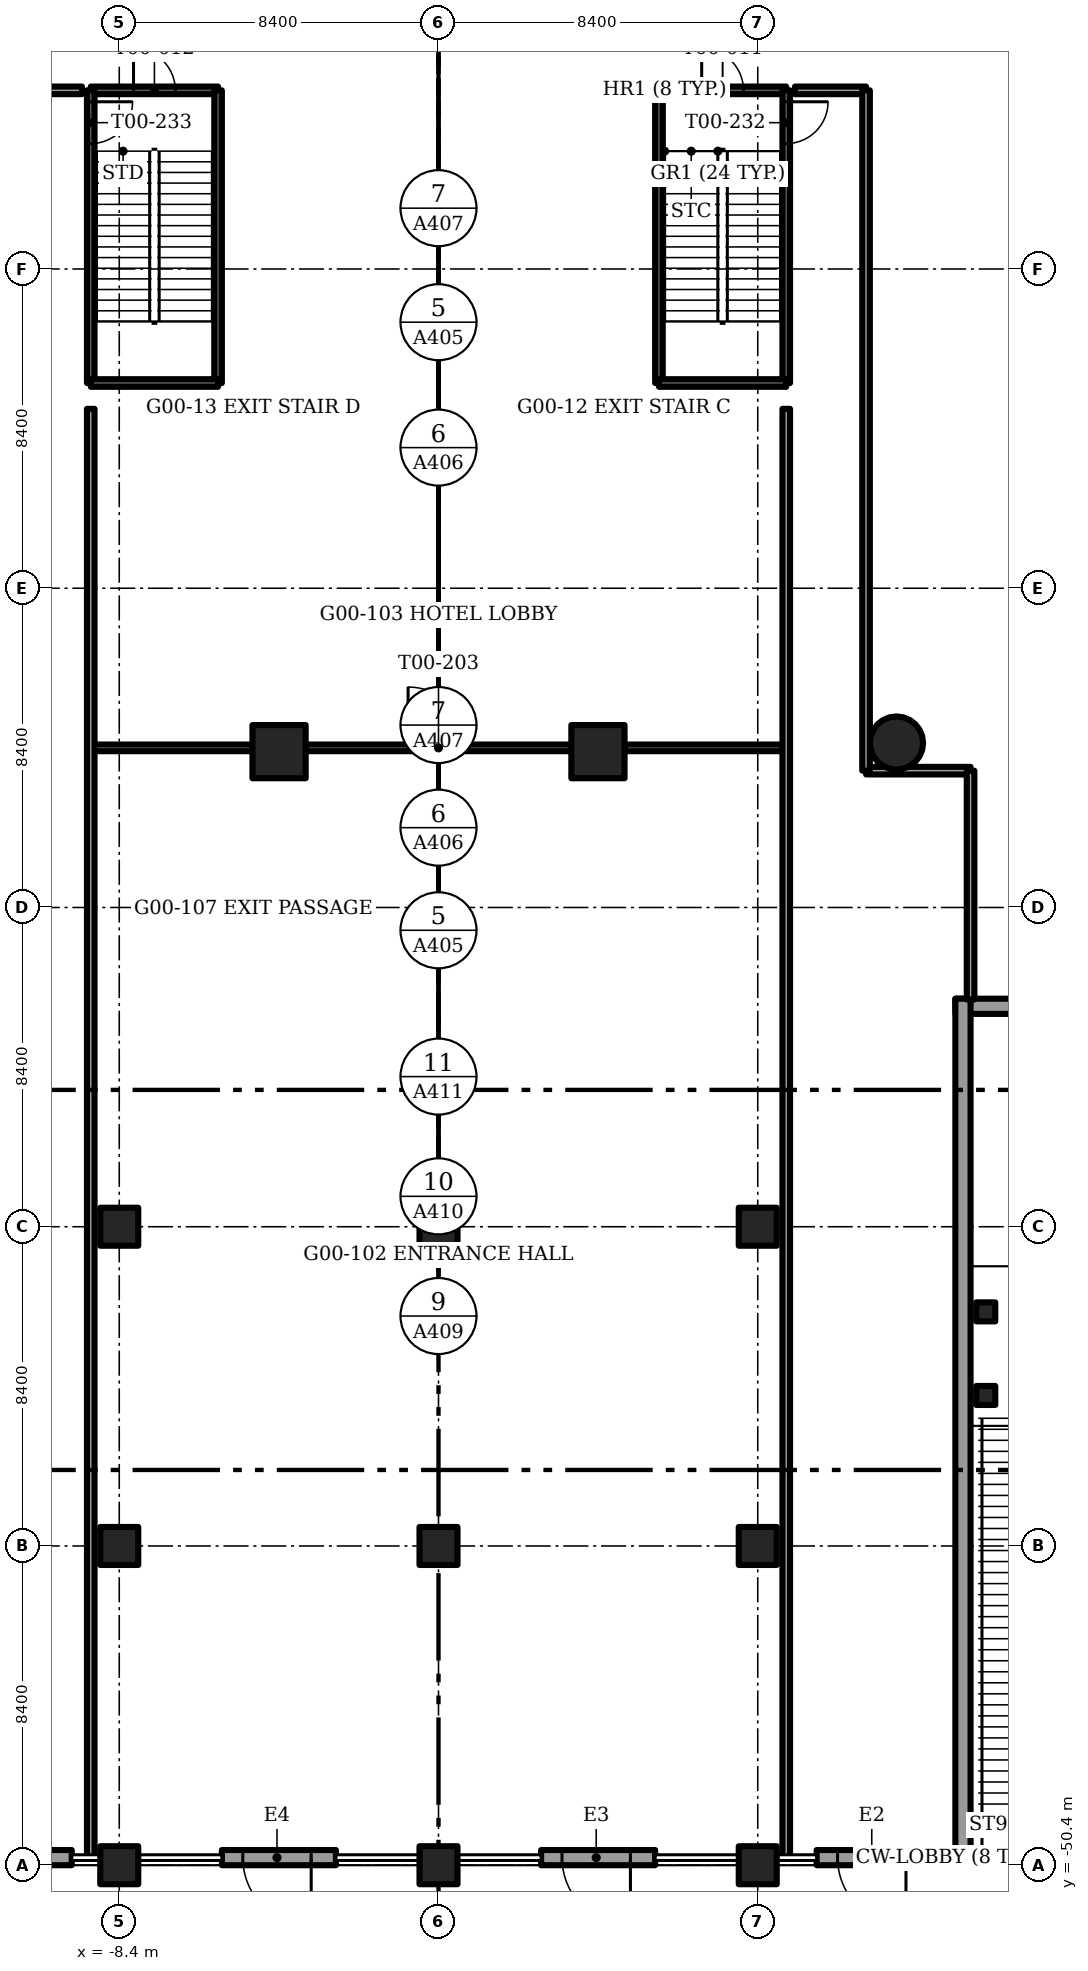
"""IFC4 building model, lengths in metres.
Left out: names, types, materials, properties, quantities, classifications, styles, units other than length and angle.
Written with IfcOpenShell. Run it as: python <this file> out.ifc"""

import sys

from ifc_helpers import new_model, si_unit, direction, frame, frame_2d, origin, origin_2d, place, context, subcontext, project, spatial, rectangle, circle, extrude, element, fill, save


model = new_model("IFC4")
c1 = context("Model", 3, precision=1e-05, world=origin(), true_north=direction((0.0, 1.0)))
c2 = subcontext(c1, "Body", "Model", "MODEL_VIEW")
j1 = project(units=[si_unit("LENGTHUNIT", "METRE"), si_unit("PLANEANGLEUNIT", "RADIAN")], contexts=[c1])
p1 = place(None, origin())
s1 = spatial("IfcSite", under=j1, at=p1, CompositionType="ELEMENT")
p2 = place(p1, origin())
s2 = spatial("IfcBuilding", under=s1, at=p2, CompositionType="ELEMENT")
p3 = place(p2, origin())
s3 = spatial("IfcBuildingStorey", under=s2, at=p3, CompositionType="ELEMENT", Elevation=0.0)
for number, where, z_axis, x_axis in (
    (1, (-8.4, -50.4, -0.35), (0.0, 0.0, 1.0), (1.0, 0.0, 0.0)),
    (2, (-8.4, -42.0, -0.35), (0.0, 0.0, 1.0), (1.0, 0.0, 0.0)),
    (3, (-8.4, -33.6, -0.35), (0.0, 0.0, 1.0), (1.0, 0.0, 0.0)),
    (4, (0.0, -50.4, -0.35), (0.0, 0.0, 1.0), (1.0, 0.0, 0.0)),
    (5, (0.0, -42.0, -0.35), (0.0, 0.0, 1.0), (1.0, 0.0, 0.0)),
    (6, (0.0, -33.6, -0.35), (0.0, 0.0, 1.0), (1.0, 0.0, 0.0)),
    (7, (8.4, -50.4, -0.35), (0.0, 0.0, 1.0), (1.0, 0.0, 0.0)),
    (8, (8.4, -42.0, -0.35), (0.0, 0.0, 1.0), (1.0, 0.0, 0.0)),
    (9, (8.4, -33.6, -0.35), (0.0, 0.0, 1.0), (1.0, 0.0, 0.0)),
):
    element("IfcColumn", number, at=place(p3, frame(where, z_axis=z_axis, x_axis=x_axis)), inside=s3, PredefinedType="COLUMN", context=c2, shape_type="SweptSolid", body=[
        extrude(rectangle(XDim=1.0, YDim=1.0, at=origin_2d()), origin(), (0.0, 0.0, 1.0), 6.0),
    ])
p4 = place(p3, frame((12.051, -20.872, -0.35), z_axis=(0.0, 0.0, 1.0), x_axis=(1.0, 0.0, 0.0)))
e10 = element("IfcColumn", 10, at=p4, inside=s3, PredefinedType="COLUMN", context=c2, shape_type="SweptSolid", body=[
    extrude(circle(Radius=0.7, at=origin_2d()), origin(), (0.0, 0.0, 1.0), 5.15),
])
for number, where, z_axis, x_axis in (
    (11, (-4.195, -21.1, -0.35), (0.0, 0.0, 1.0), (-1.0, 0.0, 0.0)),
    (12, (4.195, -21.1, -0.35), (0.0, 0.0, 1.0), (-1.0, 0.0, 0.0)),
):
    element("IfcColumn", number, at=place(p3, frame(where, z_axis=z_axis, x_axis=x_axis)), inside=s3, PredefinedType="COLUMN", context=c2, shape_type="SweptSolid", body=[
        extrude(rectangle(XDim=1.4, YDim=1.4, at=origin_2d()), origin(), (0.0, 0.0, 1.0), 5.15),
    ])
p5 = place(p3, frame((12.95, -50.2, 0.0), z_axis=(0.0, 0.0, 1.0), x_axis=(-1.0, 0.0, 0.0)))
e13 = element("IfcWall", 13, at=p5, inside=s3, PredefinedType="SOLIDWALL", context=c2, shape_type="SweptSolid", body=[
    extrude(rectangle(XDim=3.0, YDim=0.4, at=frame_2d((1.5, 0.0))), origin(), (0.0, 0.0, 1.0), 5.65),
])
p6 = place(p5, frame((0.65, 0.0, 0.0)))
e14 = element("IfcOpeningElement", 14, at=p6, cuts=e13, PredefinedType="OPENING", context=c2, shape_type="SweptSolid", body=[
    extrude(rectangle(XDim=1.8, YDim=2.4, at=frame_2d((0.9, 1.2))), frame((0.0, 0.2, 0.0), z_axis=(0.0, -1.0, 0.0), x_axis=(1.0, 0.0, 0.0)), (0.0, 0.0, 1.0), 0.4),
])
p7 = place(p3, frame((5.7, -50.2, 0.0), z_axis=(0.0, 0.0, 1.0), x_axis=(-1.0, 0.0, 0.0)))
e15 = element("IfcWall", 15, at=p7, inside=s3, PredefinedType="SOLIDWALL", context=c2, shape_type="SweptSolid", body=[
    extrude(rectangle(XDim=3.0, YDim=0.4, at=frame_2d((1.5, 0.0))), origin(), (0.0, 0.0, 1.0), 5.65),
])
p8 = place(p7, frame((0.65, 0.0, 0.0)))
e16 = element("IfcOpeningElement", 16, at=p8, cuts=e15, PredefinedType="OPENING", context=c2, shape_type="SweptSolid", body=[
    extrude(rectangle(XDim=1.8, YDim=2.4, at=frame_2d((0.9, 1.2))), frame((0.0, 0.2, 0.0), z_axis=(0.0, -1.0, 0.0), x_axis=(1.0, 0.0, 0.0)), (0.0, 0.0, 1.0), 0.4),
])
p9 = place(p3, frame((-2.7, -50.2, 0.0), z_axis=(0.0, 0.0, 1.0), x_axis=(-1.0, 0.0, 0.0)))
e17 = element("IfcWall", 17, at=p9, inside=s3, PredefinedType="SOLIDWALL", context=c2, shape_type="SweptSolid", body=[
    extrude(rectangle(XDim=3.0, YDim=0.4, at=frame_2d((1.5, 0.0))), origin(), (0.0, 0.0, 1.0), 5.65),
])
p10 = place(p9, frame((0.65, 0.0, 0.0)))
e18 = element("IfcOpeningElement", 18, at=p10, cuts=e17, PredefinedType="OPENING", context=c2, shape_type="SweptSolid", body=[
    extrude(rectangle(XDim=1.8, YDim=2.4, at=frame_2d((0.9, 1.2))), frame((0.0, 0.2, 0.0), z_axis=(0.0, -1.0, 0.0), x_axis=(1.0, 0.0, 0.0)), (0.0, 0.0, 1.0), 0.4),
])
p11 = place(p3, frame((-9.65, -50.2, 0.0), z_axis=(0.0, 0.0, 1.0), x_axis=(-1.0, 0.0, 0.0)))
e19 = element("IfcWall", 19, at=p11, inside=s3, PredefinedType="SOLIDWALL", context=c2, shape_type="SweptSolid", body=[
    extrude(rectangle(XDim=3.0, YDim=0.4, at=frame_2d((1.5, 0.0))), origin(), (0.0, 0.0, 1.0), 5.65),
])
p12 = place(p11, frame((0.65, 0.0, 0.0)))
e20 = element("IfcOpeningElement", 20, at=p12, cuts=e19, PredefinedType="OPENING", context=c2, shape_type="SweptSolid", body=[
    extrude(rectangle(XDim=1.8, YDim=2.4, at=frame_2d((0.9, 1.2))), frame((0.0, 0.2, 0.0), z_axis=(0.0, -1.0, 0.0), x_axis=(1.0, 0.0, 0.0)), (0.0, 0.0, 1.0), 0.4),
])
p13 = place(p3, frame((13.8, -27.6, 0.0), z_axis=(0.0, 0.0, 1.0), x_axis=(0.0, -1.0, 0.0)))
e21 = element("IfcWall", 21, at=p13, inside=s3, PredefinedType="SOLIDWALL", context=c2, shape_type="SweptSolid", body=[
    extrude(rectangle(XDim=22.8, YDim=0.4, at=frame_2d((11.4, 0.0))), origin(), (0.0, 0.0, 1.0), 5.65),
])
p14 = place(p3, frame((13.6, -27.8, 0.0), z_axis=(0.0, 0.0, 1.0), x_axis=(1.0, 0.0, 0.0)))
e22 = element("IfcWall", 22, at=p14, inside=s3, PredefinedType="SOLIDWALL", context=c2, shape_type="SweptSolid", body=[
    extrude(rectangle(XDim=14.8, YDim=0.4, at=frame_2d((7.4, 0.0))), origin(), (0.0, 0.0, 1.0), 5.65),
])
for number, where, z_axis, x_axis in (
    (23, (14.4, -38.04, 0.0), (0.0, 0.0, 1.0), (1.0, 0.0, 0.0)),
    (24, (14.4, -35.84, 0.0), (0.0, 0.0, 1.0), (1.0, 0.0, 0.0)),
):
    element("IfcColumn", number, at=place(p3, frame(where, z_axis=z_axis, x_axis=x_axis)), inside=s3, PredefinedType="COLUMN", context=c2, shape_type="SweptSolid", body=[
        extrude(rectangle(XDim=0.5, YDim=0.5, at=origin_2d()), origin(), (0.0, 0.0, 1.0), 5.65),
    ])
p15 = place(p3, frame((5.8, -3.7, -0.35), z_axis=(0.0, 0.0, 1.0), x_axis=(1.0, 0.0, 0.0)))
e25 = element("IfcWall", 25, at=p15, inside=s3, PredefinedType="SOLIDWALL", context=c2, shape_type="SweptSolid", body=[
    extrude(rectangle(XDim=3.35, YDim=0.2, at=frame_2d((1.675, 0.0))), origin(), (0.0, 0.0, 1.0), 6.0),
])
p16 = place(p15, frame((1.125, 0.0, 0.0)))
e26 = element("IfcOpeningElement", 26, at=p16, cuts=e25, PredefinedType="OPENING", context=c2, shape_type="SweptSolid", body=[
    extrude(rectangle(XDim=1.1, YDim=2.1, at=frame_2d((0.55, 1.05))), frame((0.0, 0.1, 0.0), z_axis=(0.0, -1.0, 0.0), x_axis=(1.0, 0.0, 0.0)), (0.0, 0.0, 1.0), 0.2),
])
p17 = place(p3, frame((5.8, -3.7, -0.35), z_axis=(0.0, 0.0, 1.0), x_axis=(0.0, -1.0, 0.0)))
e27 = element("IfcWall", 27, at=p17, inside=s3, PredefinedType="SOLIDWALL", context=c2, shape_type="SweptSolid", body=[
    extrude(rectangle(XDim=7.7, YDim=0.2, at=frame_2d((3.85, 0.0))), origin(), (0.0, 0.0, 1.0), 6.0),
])
p18 = place(p3, frame((9.15, -3.7, -0.35), z_axis=(0.0, 0.0, 1.0), x_axis=(0.0, -1.0, 0.0)))
e28 = element("IfcWall", 28, at=p18, inside=s3, PredefinedType="SOLIDWALL", context=c2, shape_type="SweptSolid", body=[
    extrude(rectangle(XDim=7.7, YDim=0.2, at=frame_2d((3.85, 0.0))), origin(), (0.0, 0.0, 1.0), 6.0),
])
p19 = place(p18, frame((0.3, 0.0, 0.0)))
e29 = element("IfcOpeningElement", 29, at=p19, cuts=e28, PredefinedType="OPENING", context=c2, shape_type="SweptSolid", body=[
    extrude(rectangle(XDim=1.1, YDim=2.1, at=frame_2d((0.55, 1.05))), frame((0.0, 0.1, 0.0), z_axis=(0.0, -1.0, 0.0), x_axis=(1.0, 0.0, 0.0)), (0.0, 0.0, 1.0), 0.2),
])
p20 = place(p3, frame((5.8, -11.4, -0.35), z_axis=(0.0, 0.0, 1.0), x_axis=(1.0, 0.0, 0.0)))
e30 = element("IfcWall", 30, at=p20, inside=s3, PredefinedType="SOLIDWALL", context=c2, shape_type="SweptSolid", body=[
    extrude(rectangle(XDim=3.35, YDim=0.2, at=frame_2d((1.675, 0.0))), origin(), (0.0, 0.0, 1.0), 6.0),
])
p21 = place(p3, frame((-9.15, -3.7, 0.0), z_axis=(0.0, 0.0, 1.0), x_axis=(1.0, 0.0, 0.0)))
e31 = element("IfcWall", 31, at=p21, inside=s3, PredefinedType="SOLIDWALL", context=c2, shape_type="SweptSolid", body=[
    extrude(rectangle(XDim=3.35, YDim=0.2, at=frame_2d((1.675, 0.0))), origin(), (0.0, 0.0, 1.0), 5.65),
])
p22 = place(p21, frame((1.125, 0.0, 0.0)))
e32 = element("IfcOpeningElement", 32, at=p22, cuts=e31, PredefinedType="OPENING", context=c2, shape_type="SweptSolid", body=[
    extrude(rectangle(XDim=1.1, YDim=2.1, at=frame_2d((0.55, 1.05))), frame((0.0, 0.1, 0.0), z_axis=(0.0, -1.0, 0.0), x_axis=(1.0, 0.0, 0.0)), (0.0, 0.0, 1.0), 0.2),
])
p23 = place(p3, frame((-9.15, -3.7, 0.0), z_axis=(0.0, 0.0, 1.0), x_axis=(0.0, -1.0, 0.0)))
e33 = element("IfcWall", 33, at=p23, inside=s3, PredefinedType="SOLIDWALL", context=c2, shape_type="SweptSolid", body=[
    extrude(rectangle(XDim=7.7, YDim=0.2, at=frame_2d((3.85, 0.0))), origin(), (0.0, 0.0, 1.0), 5.65),
])
p24 = place(p23, frame((0.3, 0.0, 0.0)))
e34 = element("IfcOpeningElement", 34, at=p24, cuts=e33, PredefinedType="OPENING", context=c2, shape_type="SweptSolid", body=[
    extrude(rectangle(XDim=1.1, YDim=2.1, at=frame_2d((0.55, 1.05))), frame((0.0, 0.1, 0.0), z_axis=(0.0, -1.0, 0.0), x_axis=(1.0, 0.0, 0.0)), (0.0, 0.0, 1.0), 0.2),
])
p25 = place(p3, frame((-5.8, -3.7, 0.0), z_axis=(0.0, 0.0, 1.0), x_axis=(0.0, -1.0, 0.0)))
e35 = element("IfcWall", 35, at=p25, inside=s3, PredefinedType="SOLIDWALL", context=c2, shape_type="SweptSolid", body=[
    extrude(rectangle(XDim=7.7, YDim=0.2, at=frame_2d((3.85, 0.0))), origin(), (0.0, 0.0, 1.0), 5.65),
])
p26 = place(p3, frame((-9.15, -11.4, 0.0), z_axis=(0.0, 0.0, 1.0), x_axis=(1.0, 0.0, 0.0)))
e36 = element("IfcWall", 36, at=p26, inside=s3, PredefinedType="SOLIDWALL", context=c2, shape_type="SweptSolid", body=[
    extrude(rectangle(XDim=3.35, YDim=0.2, at=frame_2d((1.675, 0.0))), origin(), (0.0, 0.0, 1.0), 5.65),
])
p27 = place(p3, frame((-9.15, -21.0, 0.0), z_axis=(0.0, 0.0, 1.0), x_axis=(1.0, 0.0, 0.0)))
e37 = element("IfcWall", 37, at=p27, inside=s3, PredefinedType="PARTITIONING", context=c2, shape_type="SweptSolid", body=[
    extrude(rectangle(XDim=18.3, YDim=0.175, at=frame_2d((9.15, 0.0))), origin(), (0.0, 0.0, 1.0), 4.8),
])
p28 = place(p27, frame((8.35, 0.0, 0.0)))
e38 = element("IfcOpeningElement", 38, at=p28, cuts=e37, PredefinedType="OPENING", context=c2, shape_type="SweptSolid", body=[
    extrude(rectangle(XDim=1.6, YDim=2.1, at=frame_2d((0.8, 1.05))), frame((0.0, 0.087, 0.0), z_axis=(0.0, -1.0, 0.0), x_axis=(1.0, 0.0, 0.0)), (0.0, 0.0, 1.0), 0.175),
])
p29 = place(p3, frame((11.25, -21.6, 0.0), z_axis=(0.0, 0.0, 1.0), x_axis=(1.0, 0.0, 0.0)))
e39 = element("IfcWall", 39, at=p29, inside=s3, PredefinedType="PARTITIONING", context=c2, shape_type="SweptSolid", body=[
    extrude(rectangle(XDim=2.75, YDim=0.2, at=frame_2d((1.375, 0.0))), origin(), (0.0, 0.0, 1.0), 5.65),
])
for number, where, z_axis, x_axis in (
    (40, (-11.25, -3.7, 0.0), (0.0, 0.0, 1.0), (1.0, 0.0, 0.0)),
    (41, (9.38, -3.7, 0.0), (0.0, 0.0, 1.0), (1.0, 0.0, 0.0)),
):
    element("IfcWall", number, at=place(p3, frame(where, z_axis=z_axis, x_axis=x_axis)), inside=s3, PredefinedType="PARTITIONING", context=c2, shape_type="SweptSolid", body=[
        extrude(rectangle(XDim=1.87, YDim=0.2, at=frame_2d((0.935, 0.0))), origin(), (0.0, 0.0, 1.0), 5.65),
    ])
for number, where, z_axis, x_axis in (
    (42, (-9.15, -50.181, 0.0), (0.0, 0.0, 1.0), (0.0, 1.0, 0.0)),
    (43, (9.15, -50.181, 0.0), (0.0, 0.0, 1.0), (0.0, 1.0, 0.0)),
):
    element("IfcWall", number, at=place(p3, frame(where, z_axis=z_axis, x_axis=x_axis)), inside=s3, PredefinedType="PARTITIONING", context=c2, shape_type="SweptSolid", body=[
        extrude(rectangle(XDim=38.101, YDim=0.2, at=frame_2d((19.05, 0.0))), origin(), (0.0, 0.0, 1.0), 5.65),
    ])
p30 = place(p3, frame((11.25, -21.6, 0.0), z_axis=(0.0, 0.0, 1.0), x_axis=(0.0, 1.0, 0.0)))
e44 = element("IfcWall", 44, at=p30, inside=s3, PredefinedType="PARTITIONING", context=c2, shape_type="SweptSolid", body=[
    extrude(rectangle(XDim=17.9, YDim=0.2, at=frame_2d((8.95, 0.0))), origin(), (0.0, 0.0, 1.0), 5.65),
])
p31 = place(p3, frame((14.0, -27.62, 0.0), z_axis=(0.0, 0.0, 1.0), x_axis=(0.0, 1.0, 0.0)))
e45 = element("IfcWall", 45, at=p31, inside=s3, PredefinedType="PARTITIONING", context=c2, shape_type="SweptSolid", body=[
    extrude(rectangle(XDim=6.02, YDim=0.2, at=frame_2d((3.01, 0.0))), origin(), (0.0, 0.0, 1.0), 5.65),
])
p32 = place(p6, origin())
e46 = element("IfcDoor", 46, at=p32, inside=s3, OperationType="SINGLE_SWING_LEFT", PredefinedType="DOOR", context=c2, shape_type="SweptSolid", body=[
    extrude(rectangle(XDim=1.8, YDim=2.4, at=frame_2d((0.9, 1.2))), frame((0.0, 0.025, 0.0), z_axis=(0.0, -1.0, 0.0), x_axis=(1.0, 0.0, 0.0)), (0.0, 0.0, 1.0), 0.05),
])
fill(e14, e46)
p33 = place(p8, origin())
e47 = element("IfcDoor", 47, at=p33, inside=s3, OperationType="SINGLE_SWING_LEFT", PredefinedType="DOOR", context=c2, shape_type="SweptSolid", body=[
    extrude(rectangle(XDim=1.8, YDim=2.4, at=frame_2d((0.9, 1.2))), frame((0.0, 0.025, 0.0), z_axis=(0.0, -1.0, 0.0), x_axis=(1.0, 0.0, 0.0)), (0.0, 0.0, 1.0), 0.05),
])
fill(e16, e47)
p34 = place(p10, origin())
e48 = element("IfcDoor", 48, at=p34, inside=s3, OperationType="SINGLE_SWING_LEFT", PredefinedType="DOOR", context=c2, shape_type="SweptSolid", body=[
    extrude(rectangle(XDim=1.8, YDim=2.4, at=frame_2d((0.9, 1.2))), frame((0.0, 0.025, 0.0), z_axis=(0.0, -1.0, 0.0), x_axis=(1.0, 0.0, 0.0)), (0.0, 0.0, 1.0), 0.05),
])
fill(e18, e48)
p35 = place(p16, origin())
e49 = element("IfcDoor", 49, at=p35, inside=s3, OperationType="SINGLE_SWING_LEFT", PredefinedType="DOOR", context=c2, shape_type="SweptSolid", body=[
    extrude(rectangle(XDim=1.1, YDim=2.1, at=frame_2d((0.55, 1.05))), frame((0.0, 0.025, 0.0), z_axis=(0.0, -1.0, 0.0), x_axis=(1.0, 0.0, 0.0)), (0.0, 0.0, 1.0), 0.05),
])
fill(e26, e49)
p36 = place(p22, origin())
e50 = element("IfcDoor", 50, at=p36, inside=s3, OperationType="SINGLE_SWING_LEFT", PredefinedType="DOOR", context=c2, shape_type="SweptSolid", body=[
    extrude(rectangle(XDim=1.1, YDim=2.1, at=frame_2d((0.55, 1.05))), frame((0.0, 0.025, 0.0), z_axis=(0.0, -1.0, 0.0), x_axis=(1.0, 0.0, 0.0)), (0.0, 0.0, 1.0), 0.05),
])
fill(e32, e50)
p37 = place(p28, origin())
e51 = element("IfcDoor", 51, at=p37, inside=s3, OperationType="DOUBLE_DOOR_SINGLE_SWING", PredefinedType="DOOR", context=c2, shape_type="SweptSolid", body=[
    extrude(rectangle(XDim=1.6, YDim=2.1, at=frame_2d((0.8, 1.05))), frame((0.0, 0.025, 0.0), z_axis=(0.0, -1.0, 0.0), x_axis=(1.0, 0.0, 0.0)), (0.0, 0.0, 1.0), 0.05),
])
fill(e38, e51)
p38 = place(p19, origin())
e52 = element("IfcDoor", 52, at=p38, inside=s3, OperationType="SINGLE_SWING_LEFT", PredefinedType="DOOR", context=c2, shape_type="SweptSolid", body=[
    extrude(rectangle(XDim=1.1, YDim=2.1, at=frame_2d((0.55, 1.05))), frame((0.0, 0.025, 0.0), z_axis=(0.0, -1.0, 0.0), x_axis=(1.0, 0.0, 0.0)), (0.0, 0.0, 1.0), 0.05),
])
fill(e29, e52)
p39 = place(p24, origin())
e53 = element("IfcDoor", 53, at=p39, inside=s3, OperationType="SINGLE_SWING_LEFT", PredefinedType="DOOR", context=c2, shape_type="SweptSolid", body=[
    extrude(rectangle(XDim=1.1, YDim=2.1, at=frame_2d((0.55, 1.05))), frame((0.0, 0.025, 0.0), z_axis=(0.0, -1.0, 0.0), x_axis=(1.0, 0.0, 0.0)), (0.0, 0.0, 1.0), 0.05),
])
fill(e34, e53)
save(model, sys.argv[1])
